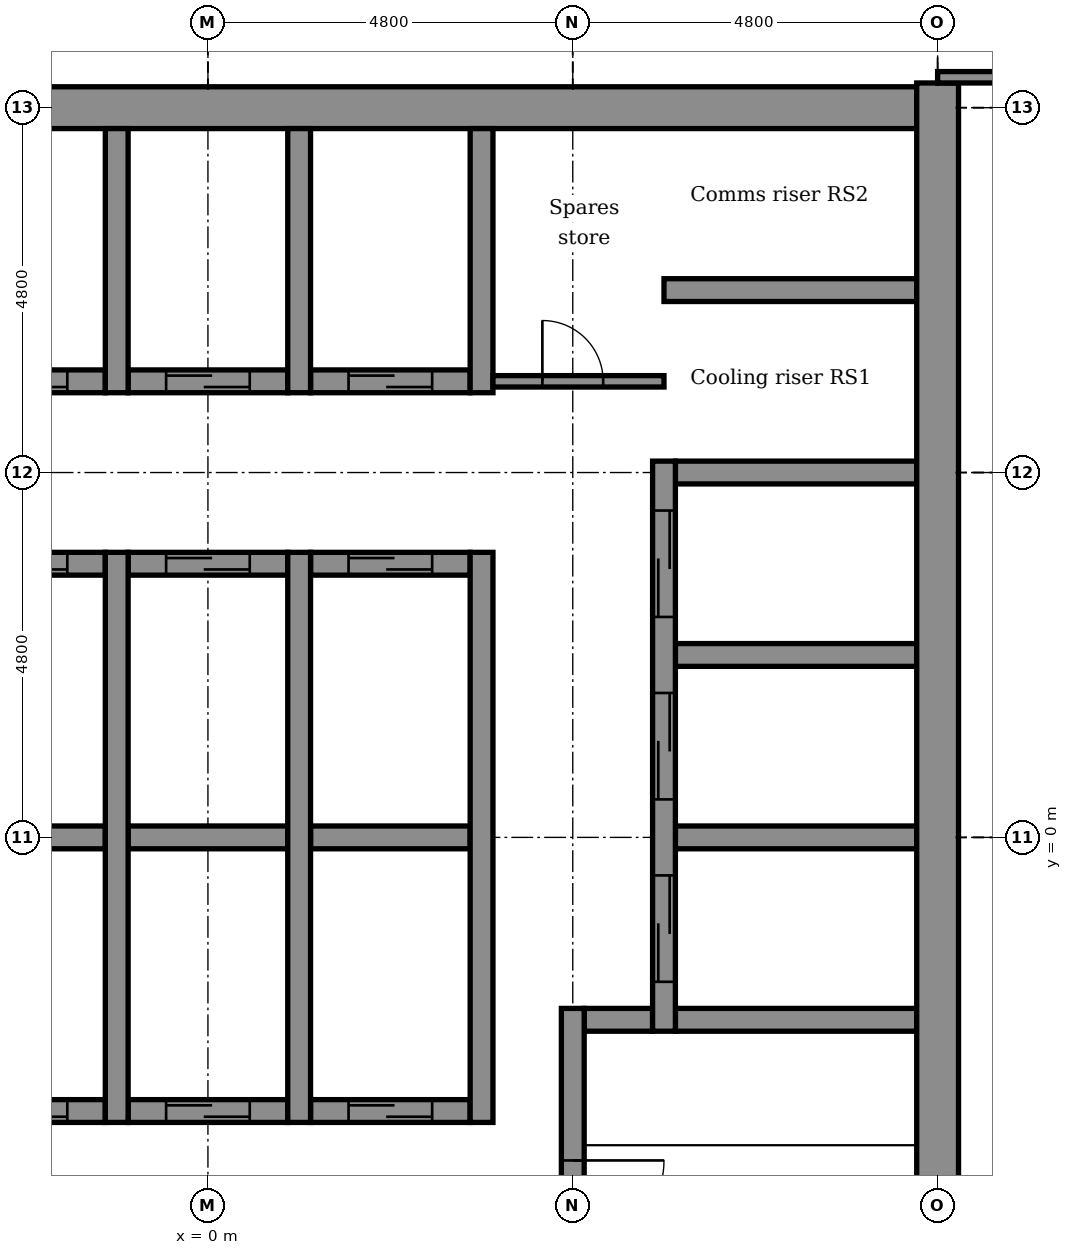
"""IFC4 building model, lengths in metres.
Left out: names, types, materials, properties, quantities, classifications, styles, units other than length and angle.
Written with IfcOpenShell. Run it as: python <this file> out.ifc"""

import sys

from ifc_helpers import new_model, si_unit, direction, frame, frame_2d, origin, place, context, subcontext, project, spatial, rectangle, extrude, element, fill, save


model = new_model("IFC4")
c1 = context("Model", 3, precision=1e-05, world=origin(), true_north=direction((0.0, 1.0)))
c2 = subcontext(c1, "Body", "Model", "MODEL_VIEW")
j1 = project(units=[si_unit("LENGTHUNIT", "METRE"), si_unit("PLANEANGLEUNIT", "RADIAN")], contexts=[c1])
p1 = place(None, origin())
s1 = spatial("IfcSite", under=j1, at=p1, CompositionType="ELEMENT")
p2 = place(p1, origin())
s2 = spatial("IfcBuilding", under=s1, at=p2, CompositionType="ELEMENT")
p3 = place(p2, frame((0.0, 0.0, 254.0)))
s3 = spatial("IfcBuildingStorey", under=s2, at=p3, CompositionType="ELEMENT", Elevation=254.0)
p4 = place(p3, frame((-3.45, -3.6, -0.15), z_axis=(0.0, 0.0, 1.0), x_axis=(1.0, 0.0, 0.0)))
e1 = element("IfcWall", 1, at=p4, inside=s3, PredefinedType="STANDARD", context=c2, shape_type="SweptSolid", body=[
    extrude(rectangle(XDim=2.1, YDim=0.3, at=frame_2d((1.05, 0.0))), origin(), (0.0, 0.0, 1.0), 3.9),
])
p5 = place(p4, frame((0.5, 0.0, 0.15)))
e2 = element("IfcOpeningElement", 2, at=p5, cuts=e1, PredefinedType="OPENING", context=c2, shape_type="SweptSolid", body=[
    extrude(rectangle(XDim=1.1, YDim=2.1, at=frame_2d((0.55, 1.05))), frame((0.0, 0.16, 0.0), z_axis=(0.0, -1.0, 0.0), x_axis=(1.0, 0.0, 0.0)), (0.0, 0.0, 1.0), 0.32),
])
p6 = place(p3, frame((-1.05, -3.6, -0.15), z_axis=(0.0, 0.0, 1.0), x_axis=(1.0, 0.0, 0.0)))
e3 = element("IfcWall", 3, at=p6, inside=s3, PredefinedType="STANDARD", context=c2, shape_type="SweptSolid", body=[
    extrude(rectangle(XDim=2.1, YDim=0.3, at=frame_2d((1.05, 0.0))), origin(), (0.0, 0.0, 1.0), 3.9),
])
p7 = place(p6, frame((0.5, 0.0, 0.15)))
e4 = element("IfcOpeningElement", 4, at=p7, cuts=e3, PredefinedType="OPENING", context=c2, shape_type="SweptSolid", body=[
    extrude(rectangle(XDim=1.1, YDim=2.1, at=frame_2d((0.55, 1.05))), frame((0.0, 0.16, 0.0), z_axis=(0.0, -1.0, 0.0), x_axis=(1.0, 0.0, 0.0)), (0.0, 0.0, 1.0), 0.32),
])
p8 = place(p3, frame((1.35, -3.6, -0.15), z_axis=(0.0, 0.0, 1.0), x_axis=(1.0, 0.0, 0.0)))
e5 = element("IfcWall", 5, at=p8, inside=s3, PredefinedType="STANDARD", context=c2, shape_type="SweptSolid", body=[
    extrude(rectangle(XDim=2.1, YDim=0.3, at=frame_2d((1.05, 0.0))), origin(), (0.0, 0.0, 1.0), 3.9),
])
p9 = place(p8, frame((0.5, 0.0, 0.15)))
e6 = element("IfcOpeningElement", 6, at=p9, cuts=e5, PredefinedType="OPENING", context=c2, shape_type="SweptSolid", body=[
    extrude(rectangle(XDim=1.1, YDim=2.1, at=frame_2d((0.55, 1.05))), frame((0.0, 0.16, 0.0), z_axis=(0.0, -1.0, 0.0), x_axis=(1.0, 0.0, 0.0)), (0.0, 0.0, 1.0), 0.32),
])
p10 = place(p3, frame((4.95, -2.4, -0.15), z_axis=(0.0, 0.0, 1.0), x_axis=(1.0, 0.0, 0.0)))
e7 = element("IfcWall", 7, at=p10, inside=s3, PredefinedType="STANDARD", context=c2, shape_type="SweptSolid", body=[
    extrude(rectangle(XDim=0.9, YDim=0.3, at=frame_2d((0.45, 0.0))), origin(), (0.0, 0.0, 1.0), 3.9),
])
p11 = place(p3, frame((6.15, -2.4, -0.15), z_axis=(0.0, 0.0, 1.0), x_axis=(1.0, 0.0, 0.0)))
e8 = element("IfcWall", 8, at=p11, inside=s3, PredefinedType="STANDARD", context=c2, shape_type="SweptSolid", body=[
    extrude(rectangle(XDim=3.175, YDim=0.3, at=frame_2d((1.587, 0.0))), origin(), (0.0, 0.0, 1.0), 3.9),
])
p12 = place(p3, frame((-3.45, 0.0, -0.15), z_axis=(0.0, 0.0, 1.0), x_axis=(1.0, 0.0, 0.0)))
e9 = element("IfcWall", 9, at=p12, inside=s3, PredefinedType="STANDARD", context=c2, shape_type="SweptSolid", body=[
    extrude(rectangle(XDim=2.1, YDim=0.3, at=frame_2d((1.05, 0.0))), origin(), (0.0, 0.0, 1.0), 3.9),
])
p13 = place(p3, frame((-1.05, 0.0, -0.15), z_axis=(0.0, 0.0, 1.0), x_axis=(1.0, 0.0, 0.0)))
e10 = element("IfcWall", 10, at=p13, inside=s3, PredefinedType="STANDARD", context=c2, shape_type="SweptSolid", body=[
    extrude(rectangle(XDim=2.1, YDim=0.3, at=frame_2d((1.05, 0.0))), origin(), (0.0, 0.0, 1.0), 3.9),
])
p14 = place(p3, frame((1.35, 0.0, -0.15), z_axis=(0.0, 0.0, 1.0), x_axis=(1.0, 0.0, 0.0)))
e11 = element("IfcWall", 11, at=p14, inside=s3, PredefinedType="STANDARD", context=c2, shape_type="SweptSolid", body=[
    extrude(rectangle(XDim=2.1, YDim=0.3, at=frame_2d((1.05, 0.0))), origin(), (0.0, 0.0, 1.0), 3.9),
])
for number, where, z_axis, x_axis in (
    (12, (6.15, 0.0, -0.15), (0.0, 0.0, 1.0), (1.0, 0.0, 0.0)),
    (13, (6.15, 2.4, -0.15), (0.0, 0.0, 1.0), (1.0, 0.0, 0.0)),
):
    element("IfcWall", number, at=place(p3, frame(where, z_axis=z_axis, x_axis=x_axis)), inside=s3, PredefinedType="STANDARD", context=c2, shape_type="SweptSolid", body=[
        extrude(rectangle(XDim=3.175, YDim=0.3, at=frame_2d((1.587, 0.0))), origin(), (0.0, 0.0, 1.0), 3.9),
    ])
p15 = place(p3, frame((-3.45, 3.6, -0.15), z_axis=(0.0, 0.0, 1.0), x_axis=(1.0, 0.0, 0.0)))
e14 = element("IfcWall", 14, at=p15, inside=s3, PredefinedType="STANDARD", context=c2, shape_type="SweptSolid", body=[
    extrude(rectangle(XDim=2.1, YDim=0.3, at=frame_2d((1.05, 0.0))), origin(), (0.0, 0.0, 1.0), 3.9),
])
p16 = place(p15, frame((0.5, 0.0, 0.15)))
e15 = element("IfcOpeningElement", 15, at=p16, cuts=e14, PredefinedType="OPENING", context=c2, shape_type="SweptSolid", body=[
    extrude(rectangle(XDim=1.1, YDim=2.1, at=frame_2d((0.55, 1.05))), frame((0.0, 0.16, 0.0), z_axis=(0.0, -1.0, 0.0), x_axis=(1.0, 0.0, 0.0)), (0.0, 0.0, 1.0), 0.32),
])
p17 = place(p3, frame((-1.05, 3.6, -0.15), z_axis=(0.0, 0.0, 1.0), x_axis=(1.0, 0.0, 0.0)))
e16 = element("IfcWall", 16, at=p17, inside=s3, PredefinedType="STANDARD", context=c2, shape_type="SweptSolid", body=[
    extrude(rectangle(XDim=2.1, YDim=0.3, at=frame_2d((1.05, 0.0))), origin(), (0.0, 0.0, 1.0), 3.9),
])
p18 = place(p17, frame((0.5, 0.0, 0.15)))
e17 = element("IfcOpeningElement", 17, at=p18, cuts=e16, PredefinedType="OPENING", context=c2, shape_type="SweptSolid", body=[
    extrude(rectangle(XDim=1.1, YDim=2.1, at=frame_2d((0.55, 1.05))), frame((0.0, 0.16, 0.0), z_axis=(0.0, -1.0, 0.0), x_axis=(1.0, 0.0, 0.0)), (0.0, 0.0, 1.0), 0.32),
])
p19 = place(p3, frame((1.35, 3.6, -0.15), z_axis=(0.0, 0.0, 1.0), x_axis=(1.0, 0.0, 0.0)))
e18 = element("IfcWall", 18, at=p19, inside=s3, PredefinedType="STANDARD", context=c2, shape_type="SweptSolid", body=[
    extrude(rectangle(XDim=2.1, YDim=0.3, at=frame_2d((1.05, 0.0))), origin(), (0.0, 0.0, 1.0), 3.9),
])
p20 = place(p19, frame((0.5, 0.0, 0.15)))
e19 = element("IfcOpeningElement", 19, at=p20, cuts=e18, PredefinedType="OPENING", context=c2, shape_type="SweptSolid", body=[
    extrude(rectangle(XDim=1.1, YDim=2.1, at=frame_2d((0.55, 1.05))), frame((0.0, 0.16, 0.0), z_axis=(0.0, -1.0, 0.0), x_axis=(1.0, 0.0, 0.0)), (0.0, 0.0, 1.0), 0.32),
])
p21 = place(p3, frame((6.15, 4.8, -0.15), z_axis=(0.0, 0.0, 1.0), x_axis=(1.0, 0.0, 0.0)))
e20 = element("IfcWall", 20, at=p21, inside=s3, PredefinedType="STANDARD", context=c2, shape_type="SweptSolid", body=[
    extrude(rectangle(XDim=3.175, YDim=0.3, at=frame_2d((1.587, 0.0))), origin(), (0.0, 0.0, 1.0), 3.9),
])
p22 = place(p3, frame((-3.45, 6.0, -0.15), z_axis=(0.0, 0.0, 1.0), x_axis=(1.0, 0.0, 0.0)))
e21 = element("IfcWall", 21, at=p22, inside=s3, PredefinedType="STANDARD", context=c2, shape_type="SweptSolid", body=[
    extrude(rectangle(XDim=2.1, YDim=0.3, at=frame_2d((1.05, 0.0))), origin(), (0.0, 0.0, 1.0), 3.9),
])
p23 = place(p22, frame((0.5, 0.0, 0.15)))
e22 = element("IfcOpeningElement", 22, at=p23, cuts=e21, PredefinedType="OPENING", context=c2, shape_type="SweptSolid", body=[
    extrude(rectangle(XDim=1.1, YDim=2.1, at=frame_2d((0.55, 1.05))), frame((0.0, 0.16, 0.0), z_axis=(0.0, -1.0, 0.0), x_axis=(1.0, 0.0, 0.0)), (0.0, 0.0, 1.0), 0.32),
])
p24 = place(p3, frame((-1.05, 6.0, -0.15), z_axis=(0.0, 0.0, 1.0), x_axis=(1.0, 0.0, 0.0)))
e23 = element("IfcWall", 23, at=p24, inside=s3, PredefinedType="STANDARD", context=c2, shape_type="SweptSolid", body=[
    extrude(rectangle(XDim=2.1, YDim=0.3, at=frame_2d((1.05, 0.0))), origin(), (0.0, 0.0, 1.0), 3.9),
])
p25 = place(p24, frame((0.5, 0.0, 0.15)))
e24 = element("IfcOpeningElement", 24, at=p25, cuts=e23, PredefinedType="OPENING", context=c2, shape_type="SweptSolid", body=[
    extrude(rectangle(XDim=1.1, YDim=2.1, at=frame_2d((0.55, 1.05))), frame((0.0, 0.16, 0.0), z_axis=(0.0, -1.0, 0.0), x_axis=(1.0, 0.0, 0.0)), (0.0, 0.0, 1.0), 0.32),
])
p26 = place(p3, frame((1.35, 6.0, -0.15), z_axis=(0.0, 0.0, 1.0), x_axis=(1.0, 0.0, 0.0)))
e25 = element("IfcWall", 25, at=p26, inside=s3, PredefinedType="STANDARD", context=c2, shape_type="SweptSolid", body=[
    extrude(rectangle(XDim=2.1, YDim=0.3, at=frame_2d((1.05, 0.0))), origin(), (0.0, 0.0, 1.0), 3.9),
])
p27 = place(p26, frame((0.5, 0.0, 0.15)))
e26 = element("IfcOpeningElement", 26, at=p27, cuts=e25, PredefinedType="OPENING", context=c2, shape_type="SweptSolid", body=[
    extrude(rectangle(XDim=1.1, YDim=2.1, at=frame_2d((0.55, 1.05))), frame((0.0, 0.16, 0.0), z_axis=(0.0, -1.0, 0.0), x_axis=(1.0, 0.0, 0.0)), (0.0, 0.0, 1.0), 0.32),
])
p28 = place(p3, frame((6.0, 7.2, -0.15), z_axis=(0.0, 0.0, 1.0), x_axis=(1.0, 0.0, 0.0)))
e27 = element("IfcWall", 27, at=p28, inside=s3, PredefinedType="STANDARD", context=c2, shape_type="SweptSolid", body=[
    extrude(rectangle(XDim=3.325, YDim=0.3, at=frame_2d((1.663, 0.0))), origin(), (0.0, 0.0, 1.0), 3.9),
])
p29 = place(p3, frame((-5.25, 9.6, -0.15), z_axis=(0.0, 0.0, 1.0), x_axis=(1.0, 0.0, 0.0)))
e28 = element("IfcWall", 28, at=p29, inside=s3, PredefinedType="SHEAR", context=c2, shape_type="SweptSolid", body=[
    extrude(rectangle(XDim=14.575, YDim=0.55, at=frame_2d((7.288, 0.0))), origin(), (0.0, 0.0, 1.0), 3.9),
])
p30 = place(p29, frame((0.6, 0.0, 0.15)))
e29 = element("IfcOpeningElement", 29, at=p30, cuts=e28, PredefinedType="OPENING", context=c2, shape_type="SweptSolid", body=[
    extrude(rectangle(XDim=0.9, YDim=2.1, at=frame_2d((0.45, 1.05))), frame((0.0, 0.285, 0.0), z_axis=(0.0, -1.0, 0.0), x_axis=(1.0, 0.0, 0.0)), (0.0, 0.0, 1.0), 0.57),
])
p31 = place(p3, frame((-1.2, -3.75, -0.15), z_axis=(0.0, 0.0, 1.0), x_axis=(0.0, 1.0, 0.0)))
e30 = element("IfcWall", 30, at=p31, inside=s3, PredefinedType="STANDARD", context=c2, shape_type="SweptSolid", body=[
    extrude(rectangle(XDim=7.5, YDim=0.3, at=frame_2d((3.75, 0.0))), origin(), (0.0, 0.0, 1.0), 3.9),
])
p32 = place(p3, frame((-1.2, 5.85, -0.15), z_axis=(0.0, 0.0, 1.0), x_axis=(0.0, 1.0, 0.0)))
e31 = element("IfcWall", 31, at=p32, inside=s3, PredefinedType="STANDARD", context=c2, shape_type="SweptSolid", body=[
    extrude(rectangle(XDim=3.475, YDim=0.3, at=frame_2d((1.737, 0.0))), origin(), (0.0, 0.0, 1.0), 3.9),
])
p33 = place(p3, frame((1.2, -3.75, -0.15), z_axis=(0.0, 0.0, 1.0), x_axis=(0.0, 1.0, 0.0)))
e32 = element("IfcWall", 32, at=p33, inside=s3, PredefinedType="STANDARD", context=c2, shape_type="SweptSolid", body=[
    extrude(rectangle(XDim=7.5, YDim=0.3, at=frame_2d((3.75, 0.0))), origin(), (0.0, 0.0, 1.0), 3.9),
])
p34 = place(p3, frame((1.2, 5.85, -0.15), z_axis=(0.0, 0.0, 1.0), x_axis=(0.0, 1.0, 0.0)))
e33 = element("IfcWall", 33, at=p34, inside=s3, PredefinedType="STANDARD", context=c2, shape_type="SweptSolid", body=[
    extrude(rectangle(XDim=3.475, YDim=0.3, at=frame_2d((1.737, 0.0))), origin(), (0.0, 0.0, 1.0), 3.9),
])
p35 = place(p3, frame((3.6, -3.75, -0.15), z_axis=(0.0, 0.0, 1.0), x_axis=(0.0, 1.0, 0.0)))
e34 = element("IfcWall", 34, at=p35, inside=s3, PredefinedType="STANDARD", context=c2, shape_type="SweptSolid", body=[
    extrude(rectangle(XDim=7.5, YDim=0.3, at=frame_2d((3.75, 0.0))), origin(), (0.0, 0.0, 1.0), 3.9),
])
p36 = place(p3, frame((3.6, 5.85, -0.15), z_axis=(0.0, 0.0, 1.0), x_axis=(0.0, 1.0, 0.0)))
e35 = element("IfcWall", 35, at=p36, inside=s3, PredefinedType="STANDARD", context=c2, shape_type="SweptSolid", body=[
    extrude(rectangle(XDim=3.475, YDim=0.3, at=frame_2d((1.737, 0.0))), origin(), (0.0, 0.0, 1.0), 3.9),
])
p37 = place(p3, frame((4.8, -9.325, -0.15), z_axis=(0.0, 0.0, 1.0), x_axis=(0.0, 1.0, 0.0)))
e36 = element("IfcWall", 36, at=p37, inside=s3, PredefinedType="STANDARD", context=c2, shape_type="SweptSolid", body=[
    extrude(rectangle(XDim=7.075, YDim=0.3, at=frame_2d((3.538, 0.0))), origin(), (0.0, 0.0, 1.0), 3.9),
])
p38 = place(p37, frame((3.875, 0.0, 0.15)))
e37 = element("IfcOpeningElement", 37, at=p38, cuts=e36, PredefinedType="OPENING", context=c2, shape_type="SweptSolid", body=[
    extrude(rectangle(XDim=1.2, YDim=2.1, at=frame_2d((0.6, 1.05))), frame((0.0, 0.16, 0.0), z_axis=(0.0, -1.0, 0.0), x_axis=(1.0, 0.0, 0.0)), (0.0, 0.0, 1.0), 0.32),
])
p39 = place(p3, frame((6.0, -2.55, -0.15), z_axis=(0.0, 0.0, 1.0), x_axis=(0.0, 1.0, 0.0)))
e38 = element("IfcWall", 38, at=p39, inside=s3, PredefinedType="STANDARD", context=c2, shape_type="SweptSolid", body=[
    extrude(rectangle(XDim=7.5, YDim=0.3, at=frame_2d((3.75, 0.0))), origin(), (0.0, 0.0, 1.0), 3.9),
])
p40 = place(p39, frame((0.65, 0.0, 0.15)))
e39 = element("IfcOpeningElement", 39, at=p40, cuts=e38, PredefinedType="OPENING", context=c2, shape_type="SweptSolid", body=[
    extrude(rectangle(XDim=1.4, YDim=2.1, at=frame_2d((0.7, 1.05))), frame((0.0, 0.16, 0.0), z_axis=(0.0, -1.0, 0.0), x_axis=(1.0, 0.0, 0.0)), (0.0, 0.0, 1.0), 0.32),
])
p41 = place(p39, frame((3.05, 0.0, 0.15)))
e40 = element("IfcOpeningElement", 40, at=p41, cuts=e38, PredefinedType="OPENING", context=c2, shape_type="SweptSolid", body=[
    extrude(rectangle(XDim=1.4, YDim=2.1, at=frame_2d((0.7, 1.05))), frame((0.0, 0.16, 0.0), z_axis=(0.0, -1.0, 0.0), x_axis=(1.0, 0.0, 0.0)), (0.0, 0.0, 1.0), 0.32),
])
p42 = place(p39, frame((5.45, 0.0, 0.15)))
e41 = element("IfcOpeningElement", 41, at=p42, cuts=e38, PredefinedType="OPENING", context=c2, shape_type="SweptSolid", body=[
    extrude(rectangle(XDim=1.4, YDim=2.1, at=frame_2d((0.7, 1.05))), frame((0.0, 0.16, 0.0), z_axis=(0.0, -1.0, 0.0), x_axis=(1.0, 0.0, 0.0)), (0.0, 0.0, 1.0), 0.32),
])
p43 = place(p3, frame((9.6, -10.15, -0.15), z_axis=(0.0, 0.0, 1.0), x_axis=(0.0, 1.0, 0.0)))
e42 = element("IfcWall", 42, at=p43, inside=s3, PredefinedType="SHEAR", context=c2, shape_type="SweptSolid", body=[
    extrude(rectangle(XDim=20.075, YDim=0.55, at=frame_2d((10.038, 0.0))), origin(), (0.0, 0.0, 1.0), 3.9),
])
p44 = place(p3, frame((3.75, 6.0, 0.0), z_axis=(0.0, 0.0, 1.0), x_axis=(1.0, 0.0, 0.0)))
e43 = element("IfcWall", 43, at=p44, inside=s3, PredefinedType="PARTITIONING", context=c2, shape_type="SweptSolid", body=[
    extrude(rectangle(XDim=2.25, YDim=0.15, at=frame_2d((1.125, 0.0))), origin(), (0.0, 0.0, 1.0), 3.75),
])
p45 = place(p44, frame((0.65, 0.0, 0.0)))
e44 = element("IfcOpeningElement", 44, at=p45, cuts=e43, PredefinedType="OPENING", context=c2, shape_type="SweptSolid", body=[
    extrude(rectangle(XDim=0.8, YDim=2.1, at=frame_2d((0.4, 1.05))), frame((0.0, 0.085, 0.0), z_axis=(0.0, -1.0, 0.0), x_axis=(1.0, 0.0, 0.0)), (0.0, 0.0, 1.0), 0.17),
])
p46 = place(p3, frame((9.6, 10.0, 0.0), z_axis=(0.0, 0.0, 1.0), x_axis=(1.0, 0.0, 0.0)))
e45 = element("IfcWall", 45, at=p46, inside=s3, PredefinedType="PARTITIONING", context=c2, shape_type="SweptSolid", body=[
    extrude(rectangle(XDim=4.955, YDim=0.15, at=frame_2d((2.477, 0.0))), origin(), (0.0, 0.0, 1.0), 3.75),
])
p47 = place(p46, frame((0.875, 0.0, 0.0)))
e46 = element("IfcOpeningElement", 46, at=p47, cuts=e45, PredefinedType="OPENING", context=c2, shape_type="SweptSolid", body=[
    extrude(rectangle(XDim=1.0, YDim=2.1, at=frame_2d((0.5, 1.05))), frame((0.0, 0.085, 0.0), z_axis=(0.0, -1.0, 0.0), x_axis=(1.0, 0.0, 0.0)), (0.0, 0.0, 1.0), 0.17),
])
p48 = place(p45, origin())
e47 = element("IfcDoor", 47, at=p48, inside=s3, OperationType="SINGLE_SWING_LEFT", PredefinedType="DOOR", context=c2, shape_type="SweptSolid", body=[
    extrude(rectangle(XDim=0.8, YDim=2.1, at=frame_2d((0.4, 1.05))), frame((0.0, 0.025, 0.0), z_axis=(0.0, -1.0, 0.0), x_axis=(1.0, 0.0, 0.0)), (0.0, 0.0, 1.0), 0.05),
])
fill(e44, e47)
p49 = place(p40, origin())
e48 = element("IfcDoor", 48, at=p49, inside=s3, OperationType="DOUBLE_DOOR_SLIDING", PredefinedType="DOOR", context=c2, shape_type="SweptSolid", body=[
    extrude(rectangle(XDim=1.4, YDim=2.1, at=frame_2d((0.7, 1.05))), frame((0.0, 0.025, 0.0), z_axis=(0.0, -1.0, 0.0), x_axis=(1.0, 0.0, 0.0)), (0.0, 0.0, 1.0), 0.05),
])
fill(e39, e48)
p50 = place(p41, origin())
e49 = element("IfcDoor", 49, at=p50, inside=s3, OperationType="DOUBLE_DOOR_SLIDING", PredefinedType="DOOR", context=c2, shape_type="SweptSolid", body=[
    extrude(rectangle(XDim=1.4, YDim=2.1, at=frame_2d((0.7, 1.05))), frame((0.0, 0.025, 0.0), z_axis=(0.0, -1.0, 0.0), x_axis=(1.0, 0.0, 0.0)), (0.0, 0.0, 1.0), 0.05),
])
fill(e40, e49)
p51 = place(p42, origin())
e50 = element("IfcDoor", 50, at=p51, inside=s3, OperationType="DOUBLE_DOOR_SLIDING", PredefinedType="DOOR", context=c2, shape_type="SweptSolid", body=[
    extrude(rectangle(XDim=1.4, YDim=2.1, at=frame_2d((0.7, 1.05))), frame((0.0, 0.025, 0.0), z_axis=(0.0, -1.0, 0.0), x_axis=(1.0, 0.0, 0.0)), (0.0, 0.0, 1.0), 0.05),
])
fill(e41, e50)
p52 = place(p23, origin())
e51 = element("IfcDoor", 51, at=p52, inside=s3, OperationType="DOUBLE_DOOR_SLIDING", PredefinedType="DOOR", context=c2, shape_type="SweptSolid", body=[
    extrude(rectangle(XDim=1.1, YDim=2.1, at=frame_2d((0.55, 1.05))), frame((0.0, 0.025, 0.0), z_axis=(0.0, -1.0, 0.0), x_axis=(1.0, 0.0, 0.0)), (0.0, 0.0, 1.0), 0.05),
])
fill(e22, e51)
p53 = place(p25, origin())
e52 = element("IfcDoor", 52, at=p53, inside=s3, OperationType="DOUBLE_DOOR_SLIDING", PredefinedType="DOOR", context=c2, shape_type="SweptSolid", body=[
    extrude(rectangle(XDim=1.1, YDim=2.1, at=frame_2d((0.55, 1.05))), frame((0.0, 0.025, 0.0), z_axis=(0.0, -1.0, 0.0), x_axis=(1.0, 0.0, 0.0)), (0.0, 0.0, 1.0), 0.05),
])
fill(e24, e52)
p54 = place(p27, origin())
e53 = element("IfcDoor", 53, at=p54, inside=s3, OperationType="DOUBLE_DOOR_SLIDING", PredefinedType="DOOR", context=c2, shape_type="SweptSolid", body=[
    extrude(rectangle(XDim=1.1, YDim=2.1, at=frame_2d((0.55, 1.05))), frame((0.0, 0.025, 0.0), z_axis=(0.0, -1.0, 0.0), x_axis=(1.0, 0.0, 0.0)), (0.0, 0.0, 1.0), 0.05),
])
fill(e26, e53)
p55 = place(p16, origin())
e54 = element("IfcDoor", 54, at=p55, inside=s3, OperationType="DOUBLE_DOOR_SLIDING", PredefinedType="DOOR", context=c2, shape_type="SweptSolid", body=[
    extrude(rectangle(XDim=1.1, YDim=2.1, at=frame_2d((0.55, 1.05))), frame((0.0, 0.025, 0.0), z_axis=(0.0, -1.0, 0.0), x_axis=(1.0, 0.0, 0.0)), (0.0, 0.0, 1.0), 0.05),
])
fill(e15, e54)
p56 = place(p18, origin())
e55 = element("IfcDoor", 55, at=p56, inside=s3, OperationType="DOUBLE_DOOR_SLIDING", PredefinedType="DOOR", context=c2, shape_type="SweptSolid", body=[
    extrude(rectangle(XDim=1.1, YDim=2.1, at=frame_2d((0.55, 1.05))), frame((0.0, 0.025, 0.0), z_axis=(0.0, -1.0, 0.0), x_axis=(1.0, 0.0, 0.0)), (0.0, 0.0, 1.0), 0.05),
])
fill(e17, e55)
p57 = place(p20, origin())
e56 = element("IfcDoor", 56, at=p57, inside=s3, OperationType="DOUBLE_DOOR_SLIDING", PredefinedType="DOOR", context=c2, shape_type="SweptSolid", body=[
    extrude(rectangle(XDim=1.1, YDim=2.1, at=frame_2d((0.55, 1.05))), frame((0.0, 0.025, 0.0), z_axis=(0.0, -1.0, 0.0), x_axis=(1.0, 0.0, 0.0)), (0.0, 0.0, 1.0), 0.05),
])
fill(e19, e56)
p58 = place(p5, origin())
e57 = element("IfcDoor", 57, at=p58, inside=s3, OperationType="DOUBLE_DOOR_SLIDING", PredefinedType="DOOR", context=c2, shape_type="SweptSolid", body=[
    extrude(rectangle(XDim=1.1, YDim=2.1, at=frame_2d((0.55, 1.05))), frame((0.0, 0.025, 0.0), z_axis=(0.0, -1.0, 0.0), x_axis=(1.0, 0.0, 0.0)), (0.0, 0.0, 1.0), 0.05),
])
fill(e2, e57)
p59 = place(p7, origin())
e58 = element("IfcDoor", 58, at=p59, inside=s3, OperationType="DOUBLE_DOOR_SLIDING", PredefinedType="DOOR", context=c2, shape_type="SweptSolid", body=[
    extrude(rectangle(XDim=1.1, YDim=2.1, at=frame_2d((0.55, 1.05))), frame((0.0, 0.025, 0.0), z_axis=(0.0, -1.0, 0.0), x_axis=(1.0, 0.0, 0.0)), (0.0, 0.0, 1.0), 0.05),
])
fill(e4, e58)
p60 = place(p9, origin())
e59 = element("IfcDoor", 59, at=p60, inside=s3, OperationType="DOUBLE_DOOR_SLIDING", PredefinedType="DOOR", context=c2, shape_type="SweptSolid", body=[
    extrude(rectangle(XDim=1.1, YDim=2.1, at=frame_2d((0.55, 1.05))), frame((0.0, 0.025, 0.0), z_axis=(0.0, -1.0, 0.0), x_axis=(1.0, 0.0, 0.0)), (0.0, 0.0, 1.0), 0.05),
])
fill(e6, e59)
p61 = place(p38, frame((1.2, 0.0, 0.0), z_axis=(0.0, 0.0, 1.0), x_axis=(-1.0, 0.0, 0.0)))
e60 = element("IfcDoor", 60, at=p61, inside=s3, OperationType="SINGLE_SWING_RIGHT", PredefinedType="DOOR", context=c2, shape_type="SweptSolid", body=[
    extrude(rectangle(XDim=1.2, YDim=2.1, at=frame_2d((0.6, 1.05))), frame((0.0, 0.025, 0.0), z_axis=(0.0, -1.0, 0.0), x_axis=(1.0, 0.0, 0.0)), (0.0, 0.0, 1.0), 0.05),
])
fill(e37, e60)
save(model, sys.argv[1])
